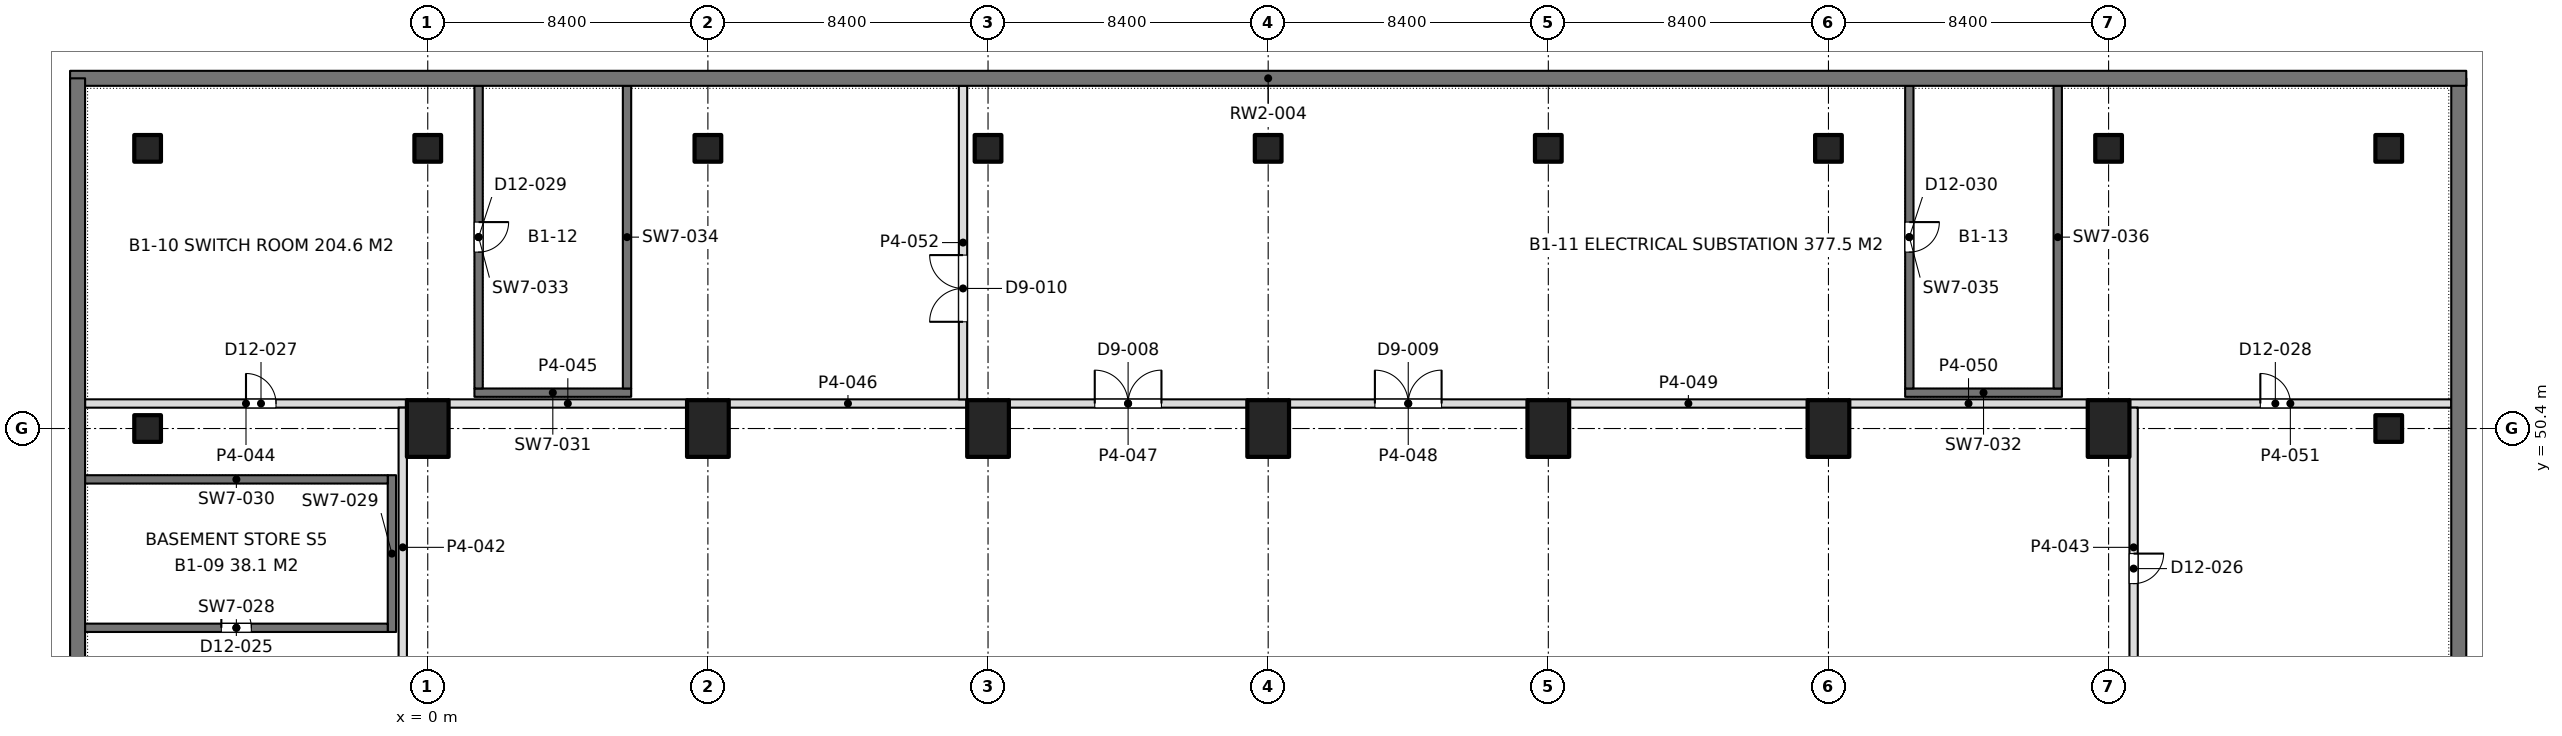
"""IFC4 building model, lengths in metres.
Left out: names, types, materials, properties, quantities, classifications, styles, units other than length and angle.
Written with IfcOpenShell. Run it as: python <this file> out.ifc"""

import sys

from ifc_helpers import new_model, si_unit, direction, frame, frame_2d, origin, origin_2d, place, context, subcontext, project, spatial, rectangle, extrude, element, fill, save


model = new_model("IFC4")
c1 = context("Model", 3, precision=1e-05, world=origin(), true_north=direction((0.0, 1.0)))
c2 = subcontext(c1, "Body", "Model", "MODEL_VIEW")
j1 = project(units=[si_unit("LENGTHUNIT", "METRE"), si_unit("PLANEANGLEUNIT", "RADIAN")], contexts=[c1])
p1 = place(None, origin())
s1 = spatial("IfcSite", under=j1, at=p1, CompositionType="ELEMENT")
p2 = place(p1, origin())
s2 = spatial("IfcBuilding", under=s1, at=p2, CompositionType="ELEMENT")
p3 = place(p2, frame((0.0, 0.0, -4.2)))
s3 = spatial("IfcBuildingStorey", under=s2, at=p3, CompositionType="ELEMENT", Elevation=-4.2)
p4 = place(p3, frame((-10.725, 60.9, 0.0), z_axis=(0.0, 0.0, 1.0), x_axis=(1.0, 0.0, 0.0)))
e1 = element("IfcWall", 1, at=p4, inside=s3, PredefinedType="SOLIDWALL", context=c2, shape_type="SweptSolid", body=[
    extrude(rectangle(XDim=71.85, YDim=0.45, at=frame_2d((35.925, 0.0))), origin(), (0.0, 0.0, 1.0), 4.2),
])
for number, where, z_axis, x_axis in (
    (2, (-10.5, -10.5, 0.0), (0.0, 0.0, 1.0), (0.0, 1.0, 0.0)),
    (3, (60.9, -10.5, 0.0), (0.0, 0.0, 1.0), (0.0, 1.0, 0.0)),
):
    element("IfcWall", number, at=place(p3, frame(where, z_axis=z_axis, x_axis=x_axis)), inside=s3, PredefinedType="SOLIDWALL", context=c2, shape_type="SweptSolid", body=[
        extrude(rectangle(XDim=71.4, YDim=0.45, at=frame_2d((35.7, 0.0))), origin(), (0.0, 0.0, 1.0), 4.2),
    ])
for number, where, z_axis, x_axis in (
    (4, (-8.4, 50.4, 0.0), (0.0, 0.0, 1.0), (1.0, 0.0, 0.0)),
    (5, (-8.4, 58.8, 0.0), (0.0, 0.0, 1.0), (1.0, 0.0, 0.0)),
):
    element("IfcColumn", number, at=place(p3, frame(where, z_axis=z_axis, x_axis=x_axis)), inside=s3, PredefinedType="COLUMN", context=c2, shape_type="SweptSolid", body=[
        extrude(rectangle(XDim=0.8, YDim=0.8, at=origin_2d()), origin(), (0.0, 0.0, 1.0), 4.2),
    ])
p5 = place(p3, frame((0.0, 50.4, 0.0), z_axis=(0.0, 0.0, 1.0), x_axis=(1.0, 0.0, 0.0)))
e6 = element("IfcColumn", 6, at=p5, inside=s3, PredefinedType="COLUMN", context=c2, shape_type="SweptSolid", body=[
    extrude(rectangle(XDim=1.25, YDim=1.7, at=origin_2d()), origin(), (0.0, 0.0, 1.0), 4.2),
])
p6 = place(p3, frame((0.0, 58.8, 0.0), z_axis=(0.0, 0.0, 1.0), x_axis=(1.0, 0.0, 0.0)))
e7 = element("IfcColumn", 7, at=p6, inside=s3, PredefinedType="COLUMN", context=c2, shape_type="SweptSolid", body=[
    extrude(rectangle(XDim=0.8, YDim=0.8, at=origin_2d()), origin(), (0.0, 0.0, 1.0), 4.2),
])
p7 = place(p3, frame((8.4, 50.4, 0.0), z_axis=(0.0, 0.0, 1.0), x_axis=(1.0, 0.0, 0.0)))
e8 = element("IfcColumn", 8, at=p7, inside=s3, PredefinedType="COLUMN", context=c2, shape_type="SweptSolid", body=[
    extrude(rectangle(XDim=1.25, YDim=1.7, at=origin_2d()), origin(), (0.0, 0.0, 1.0), 4.2),
])
p8 = place(p3, frame((8.4, 58.8, 0.0), z_axis=(0.0, 0.0, 1.0), x_axis=(1.0, 0.0, 0.0)))
e9 = element("IfcColumn", 9, at=p8, inside=s3, PredefinedType="COLUMN", context=c2, shape_type="SweptSolid", body=[
    extrude(rectangle(XDim=0.8, YDim=0.8, at=origin_2d()), origin(), (0.0, 0.0, 1.0), 4.2),
])
p9 = place(p3, frame((16.8, 50.4, 0.0), z_axis=(0.0, 0.0, 1.0), x_axis=(1.0, 0.0, 0.0)))
e10 = element("IfcColumn", 10, at=p9, inside=s3, PredefinedType="COLUMN", context=c2, shape_type="SweptSolid", body=[
    extrude(rectangle(XDim=1.25, YDim=1.7, at=origin_2d()), origin(), (0.0, 0.0, 1.0), 4.2),
])
p10 = place(p3, frame((16.8, 58.8, 0.0), z_axis=(0.0, 0.0, 1.0), x_axis=(1.0, 0.0, 0.0)))
e11 = element("IfcColumn", 11, at=p10, inside=s3, PredefinedType="COLUMN", context=c2, shape_type="SweptSolid", body=[
    extrude(rectangle(XDim=0.8, YDim=0.8, at=origin_2d()), origin(), (0.0, 0.0, 1.0), 4.2),
])
p11 = place(p3, frame((25.2, 50.4, 0.0), z_axis=(0.0, 0.0, 1.0), x_axis=(1.0, 0.0, 0.0)))
e12 = element("IfcColumn", 12, at=p11, inside=s3, PredefinedType="COLUMN", context=c2, shape_type="SweptSolid", body=[
    extrude(rectangle(XDim=1.25, YDim=1.7, at=origin_2d()), origin(), (0.0, 0.0, 1.0), 4.2),
])
p12 = place(p3, frame((25.2, 58.8, 0.0), z_axis=(0.0, 0.0, 1.0), x_axis=(1.0, 0.0, 0.0)))
e13 = element("IfcColumn", 13, at=p12, inside=s3, PredefinedType="COLUMN", context=c2, shape_type="SweptSolid", body=[
    extrude(rectangle(XDim=0.8, YDim=0.8, at=origin_2d()), origin(), (0.0, 0.0, 1.0), 4.2),
])
p13 = place(p3, frame((33.6, 50.4, 0.0), z_axis=(0.0, 0.0, 1.0), x_axis=(1.0, 0.0, 0.0)))
e14 = element("IfcColumn", 14, at=p13, inside=s3, PredefinedType="COLUMN", context=c2, shape_type="SweptSolid", body=[
    extrude(rectangle(XDim=1.25, YDim=1.7, at=origin_2d()), origin(), (0.0, 0.0, 1.0), 4.2),
])
p14 = place(p3, frame((33.6, 58.8, 0.0), z_axis=(0.0, 0.0, 1.0), x_axis=(1.0, 0.0, 0.0)))
e15 = element("IfcColumn", 15, at=p14, inside=s3, PredefinedType="COLUMN", context=c2, shape_type="SweptSolid", body=[
    extrude(rectangle(XDim=0.8, YDim=0.8, at=origin_2d()), origin(), (0.0, 0.0, 1.0), 4.2),
])
p15 = place(p3, frame((42.0, 50.4, 0.0), z_axis=(0.0, 0.0, 1.0), x_axis=(1.0, 0.0, 0.0)))
e16 = element("IfcColumn", 16, at=p15, inside=s3, PredefinedType="COLUMN", context=c2, shape_type="SweptSolid", body=[
    extrude(rectangle(XDim=1.25, YDim=1.7, at=origin_2d()), origin(), (0.0, 0.0, 1.0), 4.2),
])
p16 = place(p3, frame((42.0, 58.8, 0.0), z_axis=(0.0, 0.0, 1.0), x_axis=(1.0, 0.0, 0.0)))
e17 = element("IfcColumn", 17, at=p16, inside=s3, PredefinedType="COLUMN", context=c2, shape_type="SweptSolid", body=[
    extrude(rectangle(XDim=0.8, YDim=0.8, at=origin_2d()), origin(), (0.0, 0.0, 1.0), 4.2),
])
p17 = place(p3, frame((50.4, 50.4, 0.0), z_axis=(0.0, 0.0, 1.0), x_axis=(1.0, 0.0, 0.0)))
e18 = element("IfcColumn", 18, at=p17, inside=s3, PredefinedType="COLUMN", context=c2, shape_type="SweptSolid", body=[
    extrude(rectangle(XDim=1.25, YDim=1.7, at=origin_2d()), origin(), (0.0, 0.0, 1.0), 4.2),
])
for number, where, z_axis, x_axis in (
    (19, (50.4, 58.8, 0.0), (0.0, 0.0, 1.0), (1.0, 0.0, 0.0)),
    (20, (58.8, 50.4, 0.0), (0.0, 0.0, 1.0), (1.0, 0.0, 0.0)),
    (21, (58.8, 58.8, 0.0), (0.0, 0.0, 1.0), (1.0, 0.0, 0.0)),
):
    element("IfcColumn", number, at=place(p3, frame(where, z_axis=z_axis, x_axis=x_axis)), inside=s3, PredefinedType="COLUMN", context=c2, shape_type="SweptSolid", body=[
        extrude(rectangle(XDim=0.8, YDim=0.8, at=origin_2d()), origin(), (0.0, 0.0, 1.0), 4.2),
    ])
p18 = place(p3, frame((-10.276, 51.15, 0.0), z_axis=(0.0, 0.0, 1.0), x_axis=(1.0, 0.0, 0.0)))
e22 = element("IfcWall", 22, at=p18, inside=s3, PredefinedType="PARTITIONING", context=c2, shape_type="SweptSolid", body=[
    extrude(rectangle(XDim=9.652, YDim=0.25, at=frame_2d((4.826, 0.0))), origin(), (0.0, 0.0, 1.0), 3.8),
])
p19 = place(p18, frame((4.826, 0.0, 0.0)))
e23 = element("IfcOpeningElement", 23, at=p19, cuts=e22, PredefinedType="OPENING", context=c2, shape_type="SweptSolid", body=[
    extrude(rectangle(XDim=0.9, YDim=2.2, at=frame_2d((0.45, 1.1))), frame((0.0, 0.135, 0.0), z_axis=(0.0, -1.0, 0.0), x_axis=(1.0, 0.0, 0.0)), (0.0, 0.0, 1.0), 0.27),
])
p20 = place(p3, frame((0.624, 51.15, 0.0), z_axis=(0.0, 0.0, 1.0), x_axis=(1.0, 0.0, 0.0)))
e24 = element("IfcWall", 24, at=p20, inside=s3, PredefinedType="PARTITIONING", context=c2, shape_type="SweptSolid", body=[
    extrude(rectangle(XDim=7.152, YDim=0.25, at=frame_2d((3.576, 0.0))), origin(), (0.0, 0.0, 1.0), 3.8),
])
p21 = place(p3, frame((9.024, 51.15, 0.0), z_axis=(0.0, 0.0, 1.0), x_axis=(1.0, 0.0, 0.0)))
e25 = element("IfcWall", 25, at=p21, inside=s3, PredefinedType="PARTITIONING", context=c2, shape_type="SweptSolid", body=[
    extrude(rectangle(XDim=7.152, YDim=0.25, at=frame_2d((3.576, 0.0))), origin(), (0.0, 0.0, 1.0), 3.8),
])
p22 = place(p3, frame((17.424, 51.15, 0.0), z_axis=(0.0, 0.0, 1.0), x_axis=(1.0, 0.0, 0.0)))
e26 = element("IfcWall", 26, at=p22, inside=s3, PredefinedType="PARTITIONING", context=c2, shape_type="SweptSolid", body=[
    extrude(rectangle(XDim=7.152, YDim=0.25, at=frame_2d((3.576, 0.0))), origin(), (0.0, 0.0, 1.0), 3.8),
])
p23 = place(p22, frame((2.576, 0.0, 0.0)))
e27 = element("IfcOpeningElement", 27, at=p23, cuts=e26, PredefinedType="OPENING", context=c2, shape_type="SweptSolid", body=[
    extrude(rectangle(XDim=2.0, YDim=2.4, at=frame_2d((1.0, 1.2))), frame((0.0, 0.135, 0.0), z_axis=(0.0, -1.0, 0.0), x_axis=(1.0, 0.0, 0.0)), (0.0, 0.0, 1.0), 0.27),
])
p24 = place(p3, frame((25.824, 51.15, 0.0), z_axis=(0.0, 0.0, 1.0), x_axis=(1.0, 0.0, 0.0)))
e28 = element("IfcWall", 28, at=p24, inside=s3, PredefinedType="PARTITIONING", context=c2, shape_type="SweptSolid", body=[
    extrude(rectangle(XDim=7.152, YDim=0.25, at=frame_2d((3.576, 0.0))), origin(), (0.0, 0.0, 1.0), 3.8),
])
p25 = place(p24, frame((2.576, 0.0, 0.0)))
e29 = element("IfcOpeningElement", 29, at=p25, cuts=e28, PredefinedType="OPENING", context=c2, shape_type="SweptSolid", body=[
    extrude(rectangle(XDim=2.0, YDim=2.4, at=frame_2d((1.0, 1.2))), frame((0.0, 0.135, 0.0), z_axis=(0.0, -1.0, 0.0), x_axis=(1.0, 0.0, 0.0)), (0.0, 0.0, 1.0), 0.27),
])
for number, where, z_axis, x_axis in (
    (30, (34.224, 51.15, 0.0), (0.0, 0.0, 1.0), (1.0, 0.0, 0.0)),
    (31, (42.624, 51.15, 0.0), (0.0, 0.0, 1.0), (1.0, 0.0, 0.0)),
):
    element("IfcWall", number, at=place(p3, frame(where, z_axis=z_axis, x_axis=x_axis)), inside=s3, PredefinedType="PARTITIONING", context=c2, shape_type="SweptSolid", body=[
        extrude(rectangle(XDim=7.152, YDim=0.25, at=frame_2d((3.576, 0.0))), origin(), (0.0, 0.0, 1.0), 3.8),
    ])
p26 = place(p3, frame((51.024, 51.15, 0.0), z_axis=(0.0, 0.0, 1.0), x_axis=(1.0, 0.0, 0.0)))
e32 = element("IfcWall", 32, at=p26, inside=s3, PredefinedType="PARTITIONING", context=c2, shape_type="SweptSolid", body=[
    extrude(rectangle(XDim=9.652, YDim=0.25, at=frame_2d((4.826, 0.0))), origin(), (0.0, 0.0, 1.0), 3.8),
])
p27 = place(p26, frame((3.926, 0.0, 0.0)))
e33 = element("IfcOpeningElement", 33, at=p27, cuts=e32, PredefinedType="OPENING", context=c2, shape_type="SweptSolid", body=[
    extrude(rectangle(XDim=0.9, YDim=2.2, at=frame_2d((0.45, 1.1))), frame((0.0, 0.135, 0.0), z_axis=(0.0, -1.0, 0.0), x_axis=(1.0, 0.0, 0.0)), (0.0, 0.0, 1.0), 0.27),
])
p28 = place(p3, frame((-0.75, 42.649, 0.0), z_axis=(0.0, 0.0, 1.0), x_axis=(0.0, 1.0, 0.0)))
e34 = element("IfcWall", 34, at=p28, inside=s3, PredefinedType="PARTITIONING", context=c2, shape_type="SweptSolid", body=[
    extrude(rectangle(XDim=8.377, YDim=0.25, at=frame_2d((4.188, 0.0))), origin(), (0.0, 0.0, 1.0), 3.8),
])
p29 = place(p3, frame((51.15, 42.649, 0.0), z_axis=(0.0, 0.0, 1.0), x_axis=(0.0, 1.0, 0.0)))
e35 = element("IfcWall", 35, at=p29, inside=s3, PredefinedType="PARTITIONING", context=c2, shape_type="SweptSolid", body=[
    extrude(rectangle(XDim=8.377, YDim=0.25, at=frame_2d((4.188, 0.0))), origin(), (0.0, 0.0, 1.0), 3.8),
])
p30 = place(p29, frame((3.101, 0.0, 0.0)))
e36 = element("IfcOpeningElement", 36, at=p30, cuts=e35, PredefinedType="OPENING", context=c2, shape_type="SweptSolid", body=[
    extrude(rectangle(XDim=0.9, YDim=2.2, at=frame_2d((0.45, 1.1))), frame((0.0, 0.135, 0.0), z_axis=(0.0, -1.0, 0.0), x_axis=(1.0, 0.0, 0.0)), (0.0, 0.0, 1.0), 0.27),
])
p31 = place(p3, frame((16.05, 51.274, 0.0), z_axis=(0.0, 0.0, 1.0), x_axis=(0.0, 1.0, 0.0)))
e37 = element("IfcWall", 37, at=p31, inside=s3, PredefinedType="PARTITIONING", context=c2, shape_type="SweptSolid", body=[
    extrude(rectangle(XDim=9.402, YDim=0.25, at=frame_2d((4.701, 0.0))), origin(), (0.0, 0.0, 1.0), 3.8),
])
p32 = place(p31, frame((2.326, 0.0, 0.0)))
e38 = element("IfcOpeningElement", 38, at=p32, cuts=e37, PredefinedType="OPENING", context=c2, shape_type="SweptSolid", body=[
    extrude(rectangle(XDim=2.0, YDim=2.4, at=frame_2d((1.0, 1.2))), frame((0.0, 0.135, 0.0), z_axis=(0.0, -1.0, 0.0), x_axis=(1.0, 0.0, 0.0)), (0.0, 0.0, 1.0), 0.27),
])
p33 = place(p3, frame((1.525, 60.677, 0.0), z_axis=(0.0, 0.0, 1.0), x_axis=(0.0, -1.0, 0.0)))
e39 = element("IfcWall", 39, at=p33, inside=s3, PredefinedType="SOLIDWALL", context=c2, shape_type="SweptSolid", body=[
    extrude(rectangle(XDim=9.077, YDim=0.25, at=frame_2d((4.539, 0.0))), origin(), (0.0, 0.0, 1.0), 4.2),
])
p34 = place(p33, frame((4.087, 0.0, 0.0)))
e40 = element("IfcOpeningElement", 40, at=p34, cuts=e39, PredefinedType="OPENING", context=c2, shape_type="SweptSolid", body=[
    extrude(rectangle(XDim=0.9, YDim=2.2, at=frame_2d((0.45, 1.1))), frame((0.0, 0.135, 0.0), z_axis=(0.0, -1.0, 0.0), x_axis=(1.0, 0.0, 0.0)), (0.0, 0.0, 1.0), 0.27),
])
p35 = place(p3, frame((5.975, 60.677, 0.0), z_axis=(0.0, 0.0, 1.0), x_axis=(0.0, -1.0, 0.0)))
e41 = element("IfcWall", 41, at=p35, inside=s3, PredefinedType="SOLIDWALL", context=c2, shape_type="SweptSolid", body=[
    extrude(rectangle(XDim=9.077, YDim=0.25, at=frame_2d((4.539, 0.0))), origin(), (0.0, 0.0, 1.0), 4.2),
])
p36 = place(p3, frame((1.4, 51.475, 0.0), z_axis=(0.0, 0.0, 1.0), x_axis=(1.0, 0.0, 0.0)))
e42 = element("IfcWall", 42, at=p36, inside=s3, PredefinedType="SOLIDWALL", context=c2, shape_type="SweptSolid", body=[
    extrude(rectangle(XDim=4.7, YDim=0.25, at=frame_2d((2.35, 0.0))), origin(), (0.0, 0.0, 1.0), 4.2),
])
p37 = place(p3, frame((44.425, 60.677, 0.0), z_axis=(0.0, 0.0, 1.0), x_axis=(0.0, -1.0, 0.0)))
e43 = element("IfcWall", 43, at=p37, inside=s3, PredefinedType="SOLIDWALL", context=c2, shape_type="SweptSolid", body=[
    extrude(rectangle(XDim=9.077, YDim=0.25, at=frame_2d((4.539, 0.0))), origin(), (0.0, 0.0, 1.0), 4.2),
])
p38 = place(p37, frame((4.087, 0.0, 0.0)))
e44 = element("IfcOpeningElement", 44, at=p38, cuts=e43, PredefinedType="OPENING", context=c2, shape_type="SweptSolid", body=[
    extrude(rectangle(XDim=0.9, YDim=2.2, at=frame_2d((0.45, 1.1))), frame((0.0, 0.135, 0.0), z_axis=(0.0, -1.0, 0.0), x_axis=(1.0, 0.0, 0.0)), (0.0, 0.0, 1.0), 0.27),
])
p39 = place(p3, frame((48.875, 60.677, 0.0), z_axis=(0.0, 0.0, 1.0), x_axis=(0.0, -1.0, 0.0)))
e45 = element("IfcWall", 45, at=p39, inside=s3, PredefinedType="SOLIDWALL", context=c2, shape_type="SweptSolid", body=[
    extrude(rectangle(XDim=9.077, YDim=0.25, at=frame_2d((4.539, 0.0))), origin(), (0.0, 0.0, 1.0), 4.2),
])
p40 = place(p3, frame((44.3, 51.475, 0.0), z_axis=(0.0, 0.0, 1.0), x_axis=(1.0, 0.0, 0.0)))
e46 = element("IfcWall", 46, at=p40, inside=s3, PredefinedType="SOLIDWALL", context=c2, shape_type="SweptSolid", body=[
    extrude(rectangle(XDim=4.7, YDim=0.25, at=frame_2d((2.35, 0.0))), origin(), (0.0, 0.0, 1.0), 4.2),
])
p41 = place(p3, frame((-10.277, 44.425, 0.0), z_axis=(0.0, 0.0, 1.0), x_axis=(1.0, 0.0, 0.0)))
e47 = element("IfcWall", 47, at=p41, inside=s3, PredefinedType="SOLIDWALL", context=c2, shape_type="SweptSolid", body=[
    extrude(rectangle(XDim=9.077, YDim=0.25, at=frame_2d((4.539, 0.0))), origin(), (0.0, 0.0, 1.0), 4.2),
])
p42 = place(p41, frame((4.087, 0.0, 0.0)))
e48 = element("IfcOpeningElement", 48, at=p42, cuts=e47, PredefinedType="OPENING", context=c2, shape_type="SweptSolid", body=[
    extrude(rectangle(XDim=0.9, YDim=2.2, at=frame_2d((0.45, 1.1))), frame((0.0, 0.135, 0.0), z_axis=(0.0, -1.0, 0.0), x_axis=(1.0, 0.0, 0.0)), (0.0, 0.0, 1.0), 0.27),
])
p43 = place(p3, frame((-10.277, 48.875, 0.0), z_axis=(0.0, 0.0, 1.0), x_axis=(1.0, 0.0, 0.0)))
e49 = element("IfcWall", 49, at=p43, inside=s3, PredefinedType="SOLIDWALL", context=c2, shape_type="SweptSolid", body=[
    extrude(rectangle(XDim=9.077, YDim=0.25, at=frame_2d((4.539, 0.0))), origin(), (0.0, 0.0, 1.0), 4.2),
])
p44 = place(p3, frame((-1.075, 44.3, 0.0), z_axis=(0.0, 0.0, 1.0), x_axis=(0.0, 1.0, 0.0)))
e50 = element("IfcWall", 50, at=p44, inside=s3, PredefinedType="SOLIDWALL", context=c2, shape_type="SweptSolid", body=[
    extrude(rectangle(XDim=4.7, YDim=0.25, at=frame_2d((2.35, 0.0))), origin(), (0.0, 0.0, 1.0), 4.2),
])
p45 = place(p19, origin())
e51 = element("IfcDoor", 51, at=p45, inside=s3, OperationType="SINGLE_SWING_LEFT", PredefinedType="DOOR", context=c2, shape_type="SweptSolid", body=[
    extrude(rectangle(XDim=0.9, YDim=2.2, at=frame_2d((0.45, 1.1))), frame((0.0, 0.025, 0.0), z_axis=(0.0, -1.0, 0.0), x_axis=(1.0, 0.0, 0.0)), (0.0, 0.0, 1.0), 0.05),
])
fill(e23, e51)
p46 = place(p23, origin())
e52 = element("IfcDoor", 52, at=p46, inside=s3, OperationType="DOUBLE_DOOR_SINGLE_SWING", PredefinedType="DOOR", context=c2, shape_type="SweptSolid", body=[
    extrude(rectangle(XDim=2.0, YDim=2.4, at=frame_2d((1.0, 1.2))), frame((0.0, 0.025, 0.0), z_axis=(0.0, -1.0, 0.0), x_axis=(1.0, 0.0, 0.0)), (0.0, 0.0, 1.0), 0.05),
])
fill(e27, e52)
p47 = place(p25, origin())
e53 = element("IfcDoor", 53, at=p47, inside=s3, OperationType="DOUBLE_DOOR_SINGLE_SWING", PredefinedType="DOOR", context=c2, shape_type="SweptSolid", body=[
    extrude(rectangle(XDim=2.0, YDim=2.4, at=frame_2d((1.0, 1.2))), frame((0.0, 0.025, 0.0), z_axis=(0.0, -1.0, 0.0), x_axis=(1.0, 0.0, 0.0)), (0.0, 0.0, 1.0), 0.05),
])
fill(e29, e53)
p48 = place(p27, origin())
e54 = element("IfcDoor", 54, at=p48, inside=s3, OperationType="SINGLE_SWING_LEFT", PredefinedType="DOOR", context=c2, shape_type="SweptSolid", body=[
    extrude(rectangle(XDim=0.9, YDim=2.2, at=frame_2d((0.45, 1.1))), frame((0.0, 0.025, 0.0), z_axis=(0.0, -1.0, 0.0), x_axis=(1.0, 0.0, 0.0)), (0.0, 0.0, 1.0), 0.05),
])
fill(e33, e54)
p49 = place(p30, frame((0.9, 0.0, 0.0), z_axis=(0.0, 0.0, 1.0), x_axis=(-1.0, 0.0, 0.0)))
e55 = element("IfcDoor", 55, at=p49, inside=s3, OperationType="SINGLE_SWING_LEFT", PredefinedType="DOOR", context=c2, shape_type="SweptSolid", body=[
    extrude(rectangle(XDim=0.9, YDim=2.2, at=frame_2d((0.45, 1.1))), frame((0.0, 0.025, 0.0), z_axis=(0.0, -1.0, 0.0), x_axis=(1.0, 0.0, 0.0)), (0.0, 0.0, 1.0), 0.05),
])
fill(e36, e55)
p50 = place(p32, origin())
e56 = element("IfcDoor", 56, at=p50, inside=s3, OperationType="DOUBLE_DOOR_SINGLE_SWING", PredefinedType="DOOR", context=c2, shape_type="SweptSolid", body=[
    extrude(rectangle(XDim=2.0, YDim=2.4, at=frame_2d((1.0, 1.2))), frame((0.0, 0.025, 0.0), z_axis=(0.0, -1.0, 0.0), x_axis=(1.0, 0.0, 0.0)), (0.0, 0.0, 1.0), 0.05),
])
fill(e38, e56)
p51 = place(p34, origin())
e57 = element("IfcDoor", 57, at=p51, inside=s3, OperationType="SINGLE_SWING_LEFT", PredefinedType="DOOR", context=c2, shape_type="SweptSolid", body=[
    extrude(rectangle(XDim=0.9, YDim=2.2, at=frame_2d((0.45, 1.1))), frame((0.0, 0.025, 0.0), z_axis=(0.0, -1.0, 0.0), x_axis=(1.0, 0.0, 0.0)), (0.0, 0.0, 1.0), 0.05),
])
fill(e40, e57)
p52 = place(p38, origin())
e58 = element("IfcDoor", 58, at=p52, inside=s3, OperationType="SINGLE_SWING_LEFT", PredefinedType="DOOR", context=c2, shape_type="SweptSolid", body=[
    extrude(rectangle(XDim=0.9, YDim=2.2, at=frame_2d((0.45, 1.1))), frame((0.0, 0.025, 0.0), z_axis=(0.0, -1.0, 0.0), x_axis=(1.0, 0.0, 0.0)), (0.0, 0.0, 1.0), 0.05),
])
fill(e44, e58)
p53 = place(p42, origin())
e59 = element("IfcDoor", 59, at=p53, inside=s3, OperationType="SINGLE_SWING_LEFT", PredefinedType="DOOR", context=c2, shape_type="SweptSolid", body=[
    extrude(rectangle(XDim=0.9, YDim=2.2, at=frame_2d((0.45, 1.1))), frame((0.0, 0.025, 0.0), z_axis=(0.0, -1.0, 0.0), x_axis=(1.0, 0.0, 0.0)), (0.0, 0.0, 1.0), 0.05),
])
fill(e48, e59)
save(model, sys.argv[1])
